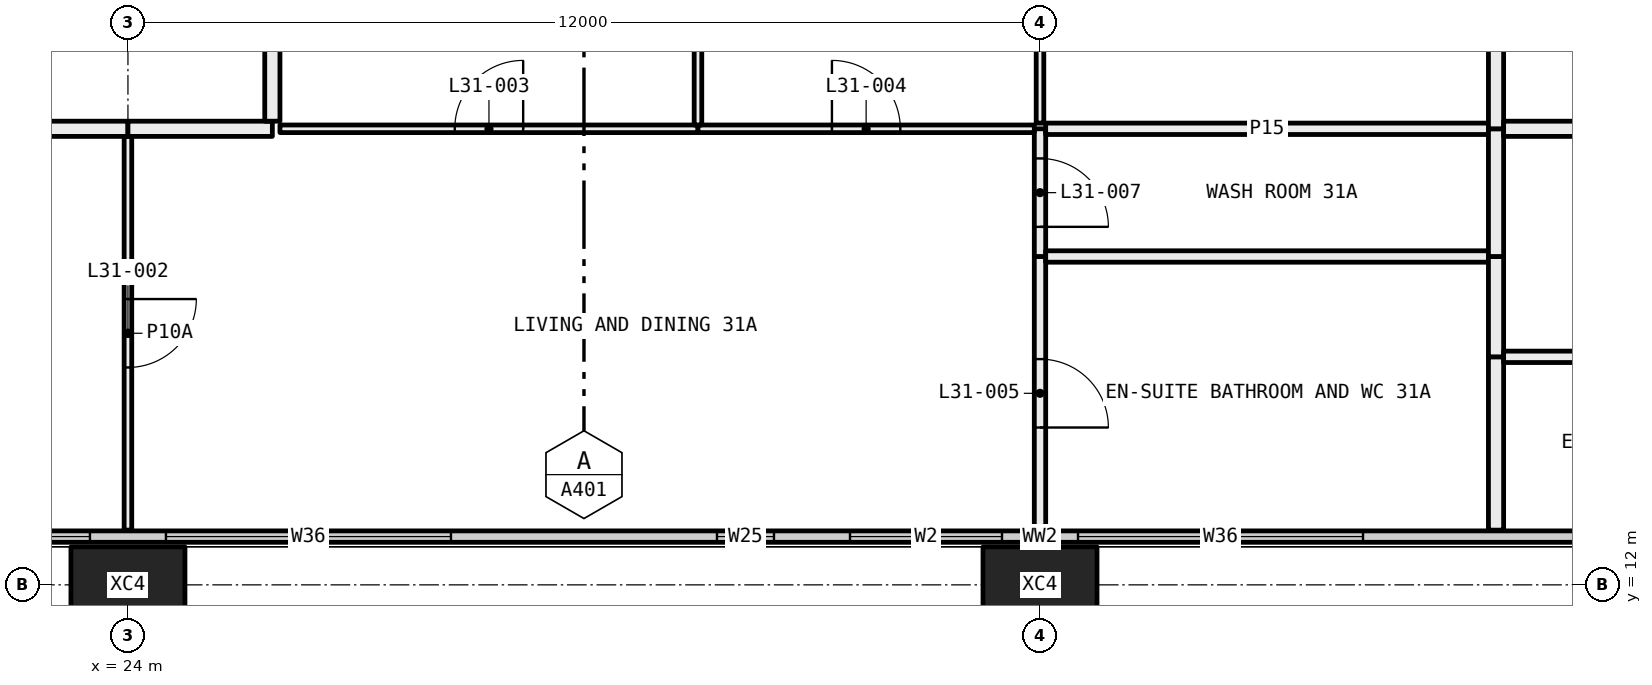
"""IFC4 building model, lengths in metres.
Left out: names, types, materials, properties, quantities, classifications, styles, units other than length and angle.
Written with IfcOpenShell. Run it as: python <this file> out.ifc"""

import sys

from ifc_helpers import new_model, si_unit, direction, frame, frame_2d, origin, origin_2d, place, context, subcontext, project, spatial, rectangle, hollow_rectangle, extrude, element, fill, save


model = new_model("IFC4")
c1 = context("Model", 3, precision=1e-05, world=origin(), true_north=direction((0.0, 1.0)))
c2 = subcontext(c1, "Body", "Model", "MODEL_VIEW")
j1 = project(units=[si_unit("LENGTHUNIT", "METRE"), si_unit("PLANEANGLEUNIT", "RADIAN")], contexts=[c1])
p1 = place(None, origin())
s1 = spatial("IfcSite", under=j1, at=p1, CompositionType="ELEMENT")
p2 = place(p1, origin())
s2 = spatial("IfcBuilding", under=s1, at=p2, CompositionType="ELEMENT")
p3 = place(p2, frame((0.0, 0.0, 120.75)))
s3 = spatial("IfcBuildingStorey", under=s2, at=p3, CompositionType="ELEMENT", Elevation=120.75)
for number, where, z_axis, x_axis in (
    (1, (24.0, 12.0, -0.4), (0.0, 0.0, 1.0), (1.0, 0.0, 0.0)),
    (2, (36.0, 12.0, -0.4), (0.0, 0.0, 1.0), (1.0, 0.0, 0.0)),
):
    element("IfcColumn", number, at=place(p3, frame(where, z_axis=z_axis, x_axis=x_axis)), inside=s3, PredefinedType="COLUMN", context=c2, shape_type="SweptSolid", body=[
        extrude(hollow_rectangle(XDim=1.5, YDim=1.0, WallThickness=0.06, at=origin_2d()), origin(), (0.0, 0.0, 1.0), 3.45),
    ])
p4 = place(p3, frame((6.56, 12.635, 0.0), z_axis=(0.0, 0.0, 1.0), x_axis=(1.0, 0.0, 0.0)))
e3 = element("IfcWall", 3, at=p4, inside=s3, PredefinedType="ELEMENTEDWALL", context=c2, shape_type="SweptSolid", body=[
    extrude(rectangle(XDim=58.88, YDim=0.15, at=frame_2d((29.44, 0.0))), origin(), (0.0, 0.0, 1.0), 3.05),
])
p5 = place(p4, frame((0.44, 0.0, 0.45)))
e4 = element("IfcOpeningElement", 4, at=p5, cuts=e3, PredefinedType="OPENING", context=c2, shape_type="SweptSolid", body=[
    extrude(rectangle(XDim=4.5, YDim=2.55, at=frame_2d((2.25, 1.275))), frame((0.0, 0.085, 0.0), z_axis=(0.0, -1.0, 0.0), x_axis=(1.0, 0.0, 0.0)), (0.0, 0.0, 1.0), 0.17),
])
p6 = place(p4, frame((5.94, 0.0, 0.45)))
e5 = element("IfcOpeningElement", 5, at=p6, cuts=e3, PredefinedType="OPENING", context=c2, shape_type="SweptSolid", body=[
    extrude(rectangle(XDim=3.75, YDim=2.55, at=frame_2d((1.875, 1.275))), frame((0.0, 0.085, 0.0), z_axis=(0.0, -1.0, 0.0), x_axis=(1.0, 0.0, 0.0)), (0.0, 0.0, 1.0), 0.17),
])
p7 = place(p4, frame((13.19, 0.0, 0.45)))
e6 = element("IfcOpeningElement", 6, at=p7, cuts=e3, PredefinedType="OPENING", context=c2, shape_type="SweptSolid", body=[
    extrude(rectangle(XDim=3.75, YDim=2.55, at=frame_2d((1.875, 1.275))), frame((0.0, 0.085, 0.0), z_axis=(0.0, -1.0, 0.0), x_axis=(1.0, 0.0, 0.0)), (0.0, 0.0, 1.0), 0.17),
])
p8 = place(p4, frame((17.94, 0.0, 0.45)))
e7 = element("IfcOpeningElement", 7, at=p8, cuts=e3, PredefinedType="OPENING", context=c2, shape_type="SweptSolid", body=[
    extrude(rectangle(XDim=3.75, YDim=2.55, at=frame_2d((1.875, 1.275))), frame((0.0, 0.085, 0.0), z_axis=(0.0, -1.0, 0.0), x_axis=(1.0, 0.0, 0.0)), (0.0, 0.0, 1.0), 0.17),
])
p9 = place(p4, frame((25.19, 0.0, 0.45)))
e8 = element("IfcOpeningElement", 8, at=p9, cuts=e3, PredefinedType="OPENING", context=c2, shape_type="SweptSolid", body=[
    extrude(rectangle(XDim=0.75, YDim=2.55, at=frame_2d((0.375, 1.275))), frame((0.0, 0.085, 0.0), z_axis=(0.0, -1.0, 0.0), x_axis=(1.0, 0.0, 0.0)), (0.0, 0.0, 1.0), 0.17),
])
p10 = place(p4, frame((26.94, 0.0, 0.45)))
e9 = element("IfcOpeningElement", 9, at=p10, cuts=e3, PredefinedType="OPENING", context=c2, shape_type="SweptSolid", body=[
    extrude(rectangle(XDim=2.0, YDim=2.55, at=frame_2d((1.0, 1.275))), frame((0.0, 0.085, 0.0), z_axis=(0.0, -1.0, 0.0), x_axis=(1.0, 0.0, 0.0)), (0.0, 0.0, 1.0), 0.17),
])
p11 = place(p4, frame((29.94, 0.0, 0.45)))
e10 = element("IfcOpeningElement", 10, at=p11, cuts=e3, PredefinedType="OPENING", context=c2, shape_type="SweptSolid", body=[
    extrude(rectangle(XDim=3.75, YDim=2.55, at=frame_2d((1.875, 1.275))), frame((0.0, 0.085, 0.0), z_axis=(0.0, -1.0, 0.0), x_axis=(1.0, 0.0, 0.0)), (0.0, 0.0, 1.0), 0.17),
])
p12 = place(p4, frame((37.19, 0.0, 0.45)))
e11 = element("IfcOpeningElement", 11, at=p12, cuts=e3, PredefinedType="OPENING", context=c2, shape_type="SweptSolid", body=[
    extrude(rectangle(XDim=3.75, YDim=2.55, at=frame_2d((1.875, 1.275))), frame((0.0, 0.085, 0.0), z_axis=(0.0, -1.0, 0.0), x_axis=(1.0, 0.0, 0.0)), (0.0, 0.0, 1.0), 0.17),
])
p13 = place(p4, frame((41.94, 0.0, 0.45)))
e12 = element("IfcOpeningElement", 12, at=p13, cuts=e3, PredefinedType="OPENING", context=c2, shape_type="SweptSolid", body=[
    extrude(rectangle(XDim=3.75, YDim=2.55, at=frame_2d((1.875, 1.275))), frame((0.0, 0.085, 0.0), z_axis=(0.0, -1.0, 0.0), x_axis=(1.0, 0.0, 0.0)), (0.0, 0.0, 1.0), 0.17),
])
p14 = place(p4, frame((49.19, 0.0, 0.45)))
e13 = element("IfcOpeningElement", 13, at=p14, cuts=e3, PredefinedType="OPENING", context=c2, shape_type="SweptSolid", body=[
    extrude(rectangle(XDim=0.75, YDim=2.55, at=frame_2d((0.375, 1.275))), frame((0.0, 0.085, 0.0), z_axis=(0.0, -1.0, 0.0), x_axis=(1.0, 0.0, 0.0)), (0.0, 0.0, 1.0), 0.17),
])
p15 = place(p4, frame((50.94, 0.0, 0.45)))
e14 = element("IfcOpeningElement", 14, at=p15, cuts=e3, PredefinedType="OPENING", context=c2, shape_type="SweptSolid", body=[
    extrude(rectangle(XDim=2.0, YDim=2.55, at=frame_2d((1.0, 1.275))), frame((0.0, 0.085, 0.0), z_axis=(0.0, -1.0, 0.0), x_axis=(1.0, 0.0, 0.0)), (0.0, 0.0, 1.0), 0.17),
])
p16 = place(p4, frame((53.94, 0.0, 0.45)))
e15 = element("IfcOpeningElement", 15, at=p16, cuts=e3, PredefinedType="OPENING", context=c2, shape_type="SweptSolid", body=[
    extrude(rectangle(XDim=4.5, YDim=2.55, at=frame_2d((2.25, 1.275))), frame((0.0, 0.085, 0.0), z_axis=(0.0, -1.0, 0.0), x_axis=(1.0, 0.0, 0.0)), (0.0, 0.0, 1.0), 0.17),
])
p17 = place(p3, frame((24.0, 12.72, 0.0), z_axis=(0.0, 0.0, 1.0), x_axis=(0.0, 1.0, 0.0)))
e16 = element("IfcWall", 16, at=p17, inside=s3, PredefinedType="PARTITIONING", context=c2, shape_type="SweptSolid", body=[
    extrude(rectangle(XDim=5.18, YDim=0.1, at=frame_2d((2.59, 0.0))), origin(), (0.0, 0.0, 1.0), 3.05),
])
p18 = place(p17, frame((2.14, 0.0, 0.0)))
e17 = element("IfcOpeningElement", 17, at=p18, cuts=e16, PredefinedType="OPENING", context=c2, shape_type="SweptSolid", body=[
    extrude(rectangle(XDim=0.9, YDim=2.1, at=frame_2d((0.45, 1.05))), frame((0.0, 0.06, 0.0), z_axis=(0.0, -1.0, 0.0), x_axis=(1.0, 0.0, 0.0)), (0.0, 0.0, 1.0), 0.12),
])
p19 = place(p3, frame((24.0, 18.0, 0.0), z_axis=(0.0, 0.0, 1.0), x_axis=(-1.0, 0.0, 0.0)))
e18 = element("IfcWall", 18, at=p19, inside=s3, PredefinedType="PARTITIONING", context=c2, shape_type="SweptSolid", body=[
    extrude(rectangle(XDim=6.0, YDim=0.2, at=frame_2d((3.0, 0.0))), origin(), (0.0, 0.0, 1.0), 3.05),
])
p20 = place(p19, frame((2.5, 0.0, 0.0)))
e19 = element("IfcOpeningElement", 19, at=p20, cuts=e18, PredefinedType="OPENING", context=c2, shape_type="SweptSolid", body=[
    extrude(rectangle(XDim=1.0, YDim=2.1, at=frame_2d((0.5, 1.05))), frame((0.0, 0.11, 0.0), z_axis=(0.0, -1.0, 0.0), x_axis=(1.0, 0.0, 0.0)), (0.0, 0.0, 1.0), 0.22),
])
p21 = place(p3, frame((36.0, 12.72, 0.0), z_axis=(0.0, 0.0, 1.0), x_axis=(0.0, 1.0, 0.0)))
e20 = element("IfcWall", 20, at=p21, inside=s3, PredefinedType="PARTITIONING", context=c2, shape_type="SweptSolid", body=[
    extrude(rectangle(XDim=3.6, YDim=0.15, at=frame_2d((1.8, 0.0))), origin(), (0.0, 0.0, 1.0), 2.45),
])
p22 = place(p21, frame((1.35, 0.0, 0.0)))
e21 = element("IfcOpeningElement", 21, at=p22, cuts=e20, PredefinedType="OPENING", context=c2, shape_type="SweptSolid", body=[
    extrude(rectangle(XDim=0.9, YDim=2.1, at=frame_2d((0.45, 1.05))), frame((0.0, 0.085, 0.0), z_axis=(0.0, -1.0, 0.0), x_axis=(1.0, 0.0, 0.0)), (0.0, 0.0, 1.0), 0.17),
])
p23 = place(p3, frame((36.0, 16.32, 0.0), z_axis=(0.0, 0.0, 1.0), x_axis=(0.0, 1.0, 0.0)))
e22 = element("IfcWall", 22, at=p23, inside=s3, PredefinedType="PARTITIONING", context=c2, shape_type="SweptSolid", body=[
    extrude(rectangle(XDim=1.68, YDim=0.15, at=frame_2d((0.84, 0.0))), origin(), (0.0, 0.0, 1.0), 2.45),
])
p24 = place(p23, frame((0.39, 0.0, 0.0)))
e23 = element("IfcOpeningElement", 23, at=p24, cuts=e22, PredefinedType="OPENING", context=c2, shape_type="SweptSolid", body=[
    extrude(rectangle(XDim=0.9, YDim=2.1, at=frame_2d((0.45, 1.05))), frame((0.0, 0.085, 0.0), z_axis=(0.0, -1.0, 0.0), x_axis=(1.0, 0.0, 0.0)), (0.0, 0.0, 1.0), 0.17),
])
p25 = place(p3, frame((31.5, 18.0, 0.0), z_axis=(0.0, 0.0, 1.0), x_axis=(-1.0, 0.0, 0.0)))
e24 = element("IfcWall", 24, at=p25, inside=s3, PredefinedType="PARTITIONING", context=c2, shape_type="SweptSolid", body=[
    extrude(rectangle(XDim=5.5, YDim=0.1, at=frame_2d((2.75, 0.0))), origin(), (0.0, 0.0, 1.0), 3.05),
])
p26 = place(p25, frame((2.3, 0.0, 0.0)))
e25 = element("IfcOpeningElement", 25, at=p26, cuts=e24, PredefinedType="OPENING", context=c2, shape_type="SweptSolid", body=[
    extrude(rectangle(XDim=0.9, YDim=2.1, at=frame_2d((0.45, 1.05))), frame((0.0, 0.06, 0.0), z_axis=(0.0, -1.0, 0.0), x_axis=(1.0, 0.0, 0.0)), (0.0, 0.0, 1.0), 0.12),
])
p27 = place(p3, frame((35.925, 18.0, 0.0), z_axis=(0.0, 0.0, 1.0), x_axis=(-1.0, 0.0, 0.0)))
e26 = element("IfcWall", 26, at=p27, inside=s3, PredefinedType="PARTITIONING", context=c2, shape_type="SweptSolid", body=[
    extrude(rectangle(XDim=4.425, YDim=0.1, at=frame_2d((2.212, 0.0))), origin(), (0.0, 0.0, 1.0), 2.45),
])
p28 = place(p27, frame((1.762, 0.0, 0.0)))
e27 = element("IfcOpeningElement", 27, at=p28, cuts=e26, PredefinedType="OPENING", context=c2, shape_type="SweptSolid", body=[
    extrude(rectangle(XDim=0.9, YDim=2.1, at=frame_2d((0.45, 1.05))), frame((0.0, 0.06, 0.0), z_axis=(0.0, -1.0, 0.0), x_axis=(1.0, 0.0, 0.0)), (0.0, 0.0, 1.0), 0.12),
])
p29 = place(p3, frame((25.9, 18.0, 0.0), z_axis=(0.0, 0.0, 1.0), x_axis=(-1.0, 0.0, 0.0)))
e28 = element("IfcWall", 28, at=p29, inside=s3, PredefinedType="PARTITIONING", context=c2, shape_type="SweptSolid", body=[
    extrude(rectangle(XDim=1.9, YDim=0.2, at=frame_2d((0.95, 0.0))), origin(), (0.0, 0.0, 1.0), 3.05),
])
p30 = place(p3, frame((41.9, 16.32, 0.0), z_axis=(0.0, 0.0, 1.0), x_axis=(-1.0, 0.0, 0.0)))
e29 = element("IfcWall", 29, at=p30, inside=s3, PredefinedType="PARTITIONING", context=c2, shape_type="SweptSolid", body=[
    extrude(rectangle(XDim=5.825, YDim=0.15, at=frame_2d((2.913, 0.0))), origin(), (0.0, 0.0, 1.0), 2.45),
])
p31 = place(p3, frame((42.0, 12.72, 0.0), z_axis=(0.0, 0.0, 1.0), x_axis=(0.0, 1.0, 0.0)))
e30 = element("IfcWall", 30, at=p31, inside=s3, PredefinedType="PARTITIONING", context=c2, shape_type="SweptSolid", body=[
    extrude(rectangle(XDim=2.28, YDim=0.2, at=frame_2d((1.14, 0.0))), origin(), (0.0, 0.0, 1.0), 3.05),
])
p32 = place(p3, frame((42.0, 15.0, 0.0), z_axis=(0.0, 0.0, 1.0), x_axis=(0.0, 1.0, 0.0)))
e31 = element("IfcWall", 31, at=p32, inside=s3, PredefinedType="PARTITIONING", context=c2, shape_type="SweptSolid", body=[
    extrude(rectangle(XDim=1.32, YDim=0.2, at=frame_2d((0.66, 0.0))), origin(), (0.0, 0.0, 1.0), 3.05),
])
p33 = place(p3, frame((41.9, 18.0, 0.0), z_axis=(0.0, 0.0, 1.0), x_axis=(-1.0, 0.0, 0.0)))
e32 = element("IfcWall", 32, at=p33, inside=s3, PredefinedType="PARTITIONING", context=c2, shape_type="SweptSolid", body=[
    extrude(rectangle(XDim=5.825, YDim=0.15, at=frame_2d((2.913, 0.0))), origin(), (0.0, 0.0, 1.0), 2.45),
])
p34 = place(p3, frame((42.0, 16.32, 0.0), z_axis=(0.0, 0.0, 1.0), x_axis=(0.0, 1.0, 0.0)))
e33 = element("IfcWall", 33, at=p34, inside=s3, PredefinedType="PARTITIONING", context=c2, shape_type="SweptSolid", body=[
    extrude(rectangle(XDim=1.68, YDim=0.2, at=frame_2d((0.84, 0.0))), origin(), (0.0, 0.0, 1.0), 3.05),
])
p35 = place(p3, frame((31.5, 18.05, 0.0), z_axis=(0.0, 0.0, 1.0), x_axis=(0.0, 1.0, 0.0)))
e34 = element("IfcWall", 34, at=p35, inside=s3, PredefinedType="PARTITIONING", context=c2, shape_type="SweptSolid", body=[
    extrude(rectangle(XDim=6.25, YDim=0.1, at=frame_2d((3.125, 0.0))), origin(), (0.0, 0.0, 1.0), 2.45),
])
p36 = place(p3, frame((25.9, 23.9, 0.0), z_axis=(0.0, 0.0, 1.0), x_axis=(0.0, -1.0, 0.0)))
e35 = element("IfcWall", 35, at=p36, inside=s3, PredefinedType="PARTITIONING", context=c2, shape_type="SweptSolid", body=[
    extrude(rectangle(XDim=5.8, YDim=0.2, at=frame_2d((2.9, 0.0))), origin(), (0.0, 0.0, 1.0), 3.05),
])
p37 = place(p3, frame((36.0, 18.075, 0.0), z_axis=(0.0, 0.0, 1.0), x_axis=(0.0, 1.0, 0.0)))
e36 = element("IfcWall", 36, at=p37, inside=s3, PredefinedType="PARTITIONING", context=c2, shape_type="SweptSolid", body=[
    extrude(rectangle(XDim=5.175, YDim=0.1, at=frame_2d((2.587, 0.0))), origin(), (0.0, 0.0, 1.0), 2.45),
])
p38 = place(p37, frame((2.137, 0.0, 0.0)))
e37 = element("IfcOpeningElement", 37, at=p38, cuts=e36, PredefinedType="OPENING", context=c2, shape_type="SweptSolid", body=[
    extrude(rectangle(XDim=0.9, YDim=2.1, at=frame_2d((0.45, 1.05))), frame((0.0, 0.06, 0.0), z_axis=(0.0, -1.0, 0.0), x_axis=(1.0, 0.0, 0.0)), (0.0, 0.0, 1.0), 0.12),
])
p39 = place(p3, frame((42.0, 18.0, 0.0), z_axis=(0.0, 0.0, 1.0), x_axis=(0.0, 1.0, 0.0)))
e38 = element("IfcWall", 38, at=p39, inside=s3, PredefinedType="PARTITIONING", context=c2, shape_type="SweptSolid", body=[
    extrude(rectangle(XDim=6.3, YDim=0.2, at=frame_2d((3.15, 0.0))), origin(), (0.0, 0.0, 1.0), 2.45),
])
p40 = place(p3, frame((48.0, 15.0, 0.0), z_axis=(0.0, 0.0, 1.0), x_axis=(-1.0, 0.0, 0.0)))
e39 = element("IfcWall", 39, at=p40, inside=s3, PredefinedType="PARTITIONING", context=c2, shape_type="SweptSolid", body=[
    extrude(rectangle(XDim=5.9, YDim=0.15, at=frame_2d((2.95, 0.0))), origin(), (0.0, 0.0, 1.0), 3.05),
])
p41 = place(p3, frame((46.1, 18.0, 0.0), z_axis=(0.0, 0.0, 1.0), x_axis=(-1.0, 0.0, 0.0)))
e40 = element("IfcWall", 40, at=p41, inside=s3, PredefinedType="PARTITIONING", context=c2, shape_type="SweptSolid", body=[
    extrude(rectangle(XDim=4.0, YDim=0.2, at=frame_2d((2.0, 0.0))), origin(), (0.0, 0.0, 1.0), 3.05),
])
p42 = place(p7, origin())
e41 = element("IfcWindow", 41, at=p42, inside=s3, PartitioningType="SINGLE_PANEL", PredefinedType="WINDOW", context=c2, shape_type="SweptSolid", body=[
    extrude(rectangle(XDim=3.75, YDim=2.55, at=frame_2d((1.875, 1.275))), frame((0.0, 0.03, 0.0), z_axis=(0.0, -1.0, 0.0), x_axis=(1.0, 0.0, 0.0)), (0.0, 0.0, 1.0), 0.06),
])
fill(e6, e41)
p43 = place(p8, origin())
e42 = element("IfcWindow", 42, at=p43, inside=s3, PartitioningType="SINGLE_PANEL", PredefinedType="WINDOW", context=c2, shape_type="SweptSolid", body=[
    extrude(rectangle(XDim=3.75, YDim=2.55, at=frame_2d((1.875, 1.275))), frame((0.0, 0.03, 0.0), z_axis=(0.0, -1.0, 0.0), x_axis=(1.0, 0.0, 0.0)), (0.0, 0.0, 1.0), 0.06),
])
fill(e7, e42)
p44 = place(p9, origin())
e43 = element("IfcWindow", 43, at=p44, inside=s3, PartitioningType="SINGLE_PANEL", PredefinedType="WINDOW", context=c2, shape_type="SweptSolid", body=[
    extrude(rectangle(XDim=0.75, YDim=2.55, at=frame_2d((0.375, 1.275))), frame((0.0, 0.03, 0.0), z_axis=(0.0, -1.0, 0.0), x_axis=(1.0, 0.0, 0.0)), (0.0, 0.0, 1.0), 0.06),
])
fill(e8, e43)
p45 = place(p10, origin())
e44 = element("IfcWindow", 44, at=p45, inside=s3, PartitioningType="SINGLE_PANEL", PredefinedType="WINDOW", context=c2, shape_type="SweptSolid", body=[
    extrude(rectangle(XDim=2.0, YDim=2.55, at=frame_2d((1.0, 1.275))), frame((0.0, 0.03, 0.0), z_axis=(0.0, -1.0, 0.0), x_axis=(1.0, 0.0, 0.0)), (0.0, 0.0, 1.0), 0.06),
])
fill(e9, e44)
p46 = place(p11, origin())
e45 = element("IfcWindow", 45, at=p46, inside=s3, PartitioningType="SINGLE_PANEL", PredefinedType="WINDOW", context=c2, shape_type="SweptSolid", body=[
    extrude(rectangle(XDim=3.75, YDim=2.55, at=frame_2d((1.875, 1.275))), frame((0.0, 0.03, 0.0), z_axis=(0.0, -1.0, 0.0), x_axis=(1.0, 0.0, 0.0)), (0.0, 0.0, 1.0), 0.06),
])
fill(e10, e45)
p47 = place(p18, frame((0.9, 0.0, 0.0), x_axis=(-1.0, 0.0, 0.0)))
e46 = element("IfcDoor", 46, at=p47, inside=s3, OperationType="SINGLE_SWING_RIGHT", PredefinedType="DOOR", context=c2, shape_type="SweptSolid", body=[
    extrude(rectangle(XDim=0.9, YDim=2.1, at=frame_2d((0.45, 1.05))), frame((0.0, 0.025, 0.0), z_axis=(0.0, -1.0, 0.0), x_axis=(1.0, 0.0, 0.0)), (0.0, 0.0, 1.0), 0.05),
])
fill(e17, e46)
p48 = place(p26, frame((0.9, 0.0, 0.0), x_axis=(-1.0, 0.0, 0.0)))
e47 = element("IfcDoor", 47, at=p48, inside=s3, OperationType="SINGLE_SWING_LEFT", PredefinedType="DOOR", context=c2, shape_type="SweptSolid", body=[
    extrude(rectangle(XDim=0.9, YDim=2.1, at=frame_2d((0.45, 1.05))), frame((0.0, 0.025, 0.0), z_axis=(0.0, -1.0, 0.0), x_axis=(1.0, 0.0, 0.0)), (0.0, 0.0, 1.0), 0.05),
])
fill(e25, e47)
p49 = place(p28, frame((0.9, 0.0, 0.0), x_axis=(-1.0, 0.0, 0.0)))
e48 = element("IfcDoor", 48, at=p49, inside=s3, OperationType="SINGLE_SWING_RIGHT", PredefinedType="DOOR", context=c2, shape_type="SweptSolid", body=[
    extrude(rectangle(XDim=0.9, YDim=2.1, at=frame_2d((0.45, 1.05))), frame((0.0, 0.025, 0.0), z_axis=(0.0, -1.0, 0.0), x_axis=(1.0, 0.0, 0.0)), (0.0, 0.0, 1.0), 0.05),
])
fill(e27, e48)
p50 = place(p22, frame((0.9, 0.0, 0.0), x_axis=(-1.0, 0.0, 0.0)))
e49 = element("IfcDoor", 49, at=p50, inside=s3, OperationType="SINGLE_SWING_LEFT", PredefinedType="DOOR", context=c2, shape_type="SweptSolid", body=[
    extrude(rectangle(XDim=0.9, YDim=2.1, at=frame_2d((0.45, 1.05))), frame((0.0, 0.025, 0.0), z_axis=(0.0, -1.0, 0.0), x_axis=(1.0, 0.0, 0.0)), (0.0, 0.0, 1.0), 0.05),
])
fill(e21, e49)
p51 = place(p24, frame((0.9, 0.0, 0.0), x_axis=(-1.0, 0.0, 0.0)))
e50 = element("IfcDoor", 50, at=p51, inside=s3, OperationType="SINGLE_SWING_LEFT", PredefinedType="DOOR", context=c2, shape_type="SweptSolid", body=[
    extrude(rectangle(XDim=0.9, YDim=2.1, at=frame_2d((0.45, 1.05))), frame((0.0, 0.025, 0.0), z_axis=(0.0, -1.0, 0.0), x_axis=(1.0, 0.0, 0.0)), (0.0, 0.0, 1.0), 0.05),
])
fill(e23, e50)
save(model, sys.argv[1])
